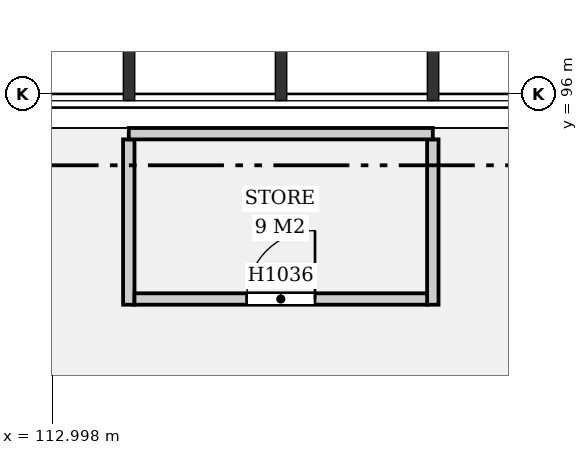
"""IFC4 building model, lengths in metres.
Left out: names, types, materials, properties, quantities, classifications, styles, units other than length and angle.
Written with IfcOpenShell. Run it as: python <this file> out.ifc"""

import sys

from ifc_helpers import new_model, si_unit, direction, frame, frame_2d, origin, place, context, subcontext, project, spatial, rectangle, extrude, element, fill, save


model = new_model("IFC4")
c1 = context("Model", 3, precision=1e-05, world=origin(), true_north=direction((0.0, 1.0)))
c2 = subcontext(c1, "Body", "Model", "MODEL_VIEW")
j1 = project(units=[si_unit("LENGTHUNIT", "METRE"), si_unit("PLANEANGLEUNIT", "RADIAN")], contexts=[c1])
p1 = place(None, origin())
s1 = spatial("IfcSite", under=j1, at=p1, CompositionType="ELEMENT")
p2 = place(p1, origin())
s2 = spatial("IfcBuilding", under=s1, at=p2, CompositionType="ELEMENT")
p3 = place(p2, frame((0.0, 0.0, 5.0)))
s3 = spatial("IfcBuildingStorey", under=s2, at=p3, CompositionType="ELEMENT", Elevation=5.0)
p4 = place(p3, frame((114.075, 93.3, 0.0), z_axis=(0.0, 0.0, 1.0), x_axis=(1.0, 0.0, 0.0)))
e1 = element("IfcWall", 1, at=p4, inside=s3, PredefinedType="PARTITIONING", context=c2, shape_type="SweptSolid", body=[
    extrude(rectangle(XDim=3.85, YDim=0.15, at=frame_2d((1.925, 0.0))), origin(), (0.0, 0.0, 1.0), 4.15),
])
p5 = place(p4, frame((1.475, 0.0, 0.0)))
e2 = element("IfcOpeningElement", 2, at=p5, cuts=e1, PredefinedType="OPENING", context=c2, shape_type="SweptSolid", body=[
    extrude(rectangle(XDim=0.9, YDim=2.1, at=frame_2d((0.45, 1.05))), frame((0.0, 0.085, 0.0), z_axis=(0.0, -1.0, 0.0), x_axis=(1.0, 0.0, 0.0)), (0.0, 0.0, 1.0), 0.17),
])
for number, where, z_axis, x_axis in (
    (3, (114.0, 95.4, 0.0), (0.0, 0.0, 1.0), (0.0, -1.0, 0.0)),
    (4, (118.0, 95.4, 0.0), (0.0, 0.0, 1.0), (0.0, -1.0, 0.0)),
):
    element("IfcWall", number, at=place(p3, frame(where, z_axis=z_axis, x_axis=x_axis)), inside=s3, PredefinedType="PARTITIONING", context=c2, shape_type="SweptSolid", body=[
        extrude(rectangle(XDim=2.175, YDim=0.15, at=frame_2d((1.087, 0.0))), origin(), (0.0, 0.0, 1.0), 4.15),
    ])
p6 = place(p3, frame((114.0, 95.475, 0.0), z_axis=(0.0, 0.0, 1.0), x_axis=(1.0, 0.0, 0.0)))
e5 = element("IfcWall", 5, at=p6, inside=s3, PredefinedType="PARTITIONING", context=c2, shape_type="SweptSolid", body=[
    extrude(rectangle(XDim=4.0, YDim=0.15, at=frame_2d((2.0, 0.0))), origin(), (0.0, 0.0, 1.0), 4.15),
])
p7 = place(p5, origin())
e6 = element("IfcDoor", 6, at=p7, inside=s3, OperationType="SINGLE_SWING_RIGHT", PredefinedType="DOOR", context=c2, shape_type="SweptSolid", body=[
    extrude(rectangle(XDim=0.9, YDim=2.1, at=frame_2d((0.45, 1.05))), frame((0.0, 0.025, 0.0), z_axis=(0.0, -1.0, 0.0), x_axis=(1.0, 0.0, 0.0)), (0.0, 0.0, 1.0), 0.05),
])
fill(e2, e6)
save(model, sys.argv[1])
